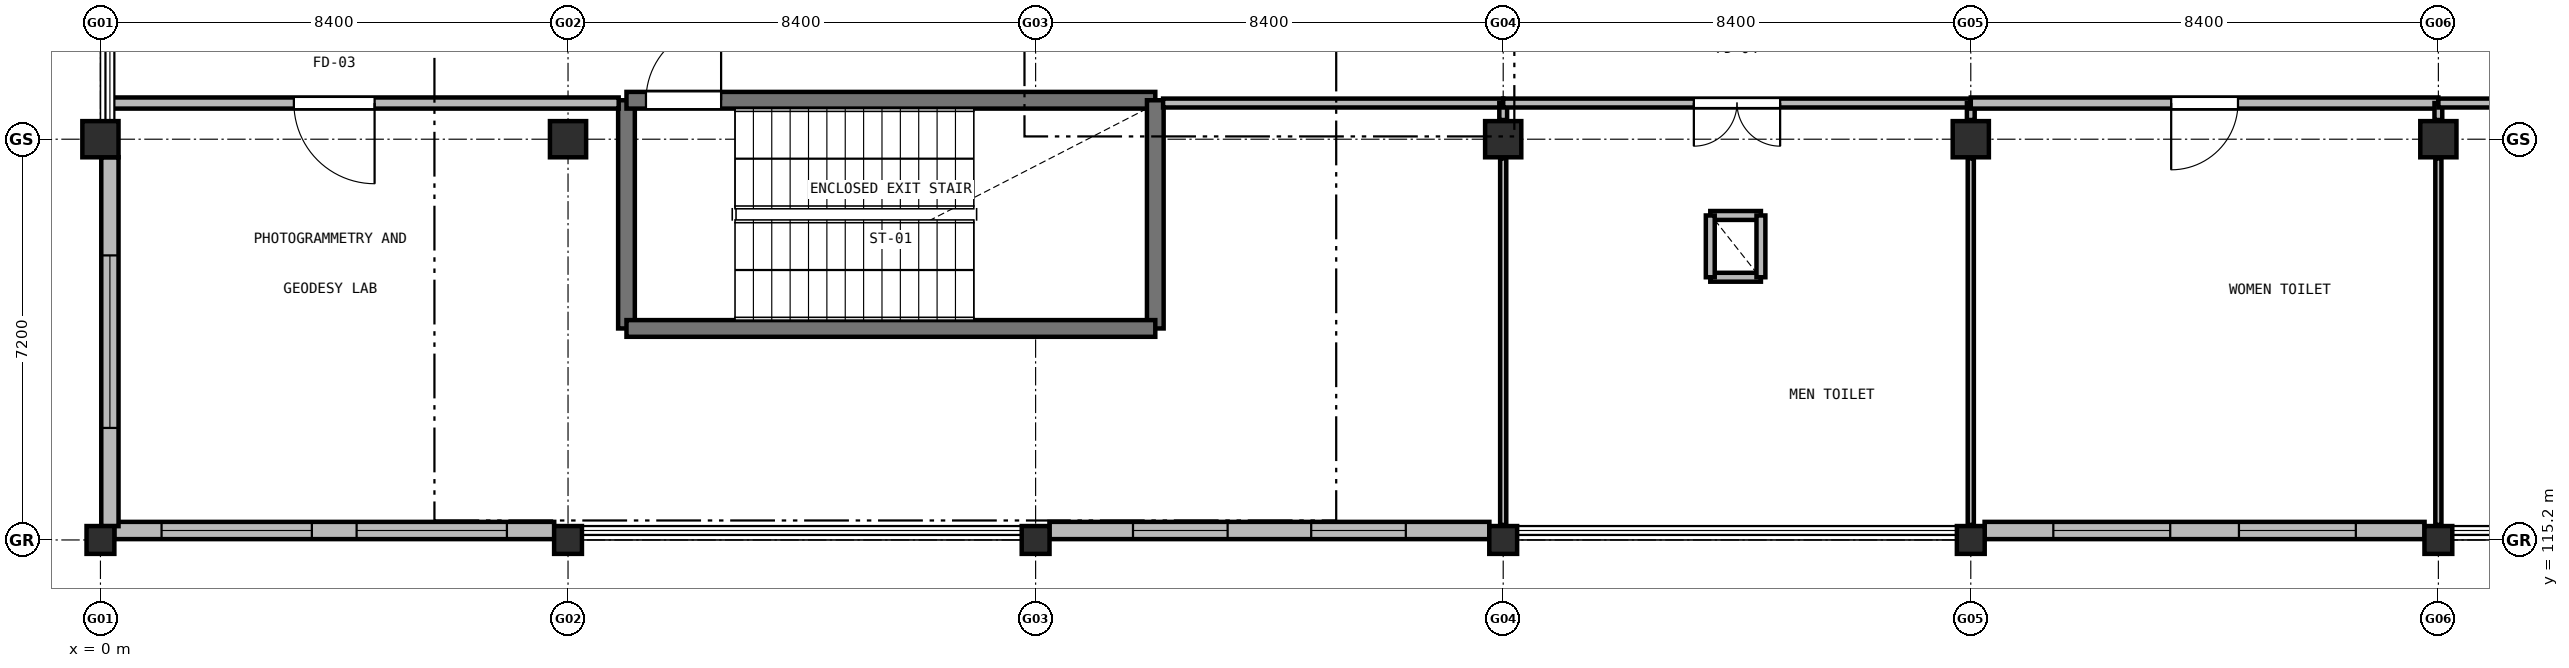
"""IFC4 building model, lengths in metres.
Left out: names, types, materials, properties, quantities, classifications, styles, units other than length and angle.
Written with IfcOpenShell. Run it as: python <this file> out.ifc"""

import sys

from ifc_helpers import new_model, si_unit, direction, frame, frame_2d, origin, origin_2d, place, context, subcontext, project, spatial, rectangle, extrude, element, fill, save


model = new_model("IFC4")
c1 = context("Model", 3, precision=1e-05, world=origin(), true_north=direction((0.0, 1.0)))
c2 = subcontext(c1, "Body", "Model", "MODEL_VIEW")
j1 = project(units=[si_unit("LENGTHUNIT", "METRE"), si_unit("PLANEANGLEUNIT", "RADIAN")], contexts=[c1])
p1 = place(None, origin())
s1 = spatial("IfcSite", under=j1, at=p1, CompositionType="ELEMENT")
p2 = place(p1, origin())
s2 = spatial("IfcBuilding", under=s1, at=p2, CompositionType="ELEMENT")
p3 = place(p2, frame((0.0, 0.0, 13.5)))
s3 = spatial("IfcBuildingStorey", under=s2, at=p3, CompositionType="ELEMENT", Elevation=13.5)
p4 = place(p3, frame((0.0, 115.2, 0.0), z_axis=(0.0, 0.0, 1.0), x_axis=(1.0, 0.0, 0.0)))
e1 = element("IfcColumn", 1, at=p4, inside=s3, PredefinedType="COLUMN", context=c2, shape_type="SweptSolid", body=[
    extrude(rectangle(XDim=0.5, YDim=0.5, at=origin_2d()), origin(), (0.0, 0.0, 1.0), 4.2),
])
p5 = place(p3, frame((0.0, 122.4, 0.0), z_axis=(0.0, 0.0, 1.0), x_axis=(1.0, 0.0, 0.0)))
e2 = element("IfcColumn", 2, at=p5, inside=s3, PredefinedType="COLUMN", context=c2, shape_type="SweptSolid", body=[
    extrude(rectangle(XDim=0.65, YDim=0.65, at=origin_2d()), origin(), (0.0, 0.0, 1.0), 4.2),
])
p6 = place(p3, frame((8.4, 115.2, 0.0), z_axis=(0.0, 0.0, 1.0), x_axis=(1.0, 0.0, 0.0)))
e3 = element("IfcColumn", 3, at=p6, inside=s3, PredefinedType="COLUMN", context=c2, shape_type="SweptSolid", body=[
    extrude(rectangle(XDim=0.5, YDim=0.5, at=origin_2d()), origin(), (0.0, 0.0, 1.0), 4.2),
])
p7 = place(p3, frame((8.4, 122.4, 0.0), z_axis=(0.0, 0.0, 1.0), x_axis=(1.0, 0.0, 0.0)))
e4 = element("IfcColumn", 4, at=p7, inside=s3, PredefinedType="COLUMN", context=c2, shape_type="SweptSolid", body=[
    extrude(rectangle(XDim=0.65, YDim=0.65, at=origin_2d()), origin(), (0.0, 0.0, 1.0), 4.2),
])
for number, where, z_axis, x_axis in (
    (5, (16.8, 115.2, 0.0), (0.0, 0.0, 1.0), (1.0, 0.0, 0.0)),
    (6, (25.2, 115.2, 0.0), (0.0, 0.0, 1.0), (1.0, 0.0, 0.0)),
):
    element("IfcColumn", number, at=place(p3, frame(where, z_axis=z_axis, x_axis=x_axis)), inside=s3, PredefinedType="COLUMN", context=c2, shape_type="SweptSolid", body=[
        extrude(rectangle(XDim=0.5, YDim=0.5, at=origin_2d()), origin(), (0.0, 0.0, 1.0), 4.2),
    ])
p8 = place(p3, frame((25.2, 122.4, 0.0), z_axis=(0.0, 0.0, 1.0), x_axis=(1.0, 0.0, 0.0)))
e7 = element("IfcColumn", 7, at=p8, inside=s3, PredefinedType="COLUMN", context=c2, shape_type="SweptSolid", body=[
    extrude(rectangle(XDim=0.65, YDim=0.65, at=origin_2d()), origin(), (0.0, 0.0, 1.0), 4.2),
])
p9 = place(p3, frame((33.6, 115.2, 0.0), z_axis=(0.0, 0.0, 1.0), x_axis=(1.0, 0.0, 0.0)))
e8 = element("IfcColumn", 8, at=p9, inside=s3, PredefinedType="COLUMN", context=c2, shape_type="SweptSolid", body=[
    extrude(rectangle(XDim=0.5, YDim=0.5, at=origin_2d()), origin(), (0.0, 0.0, 1.0), 4.2),
])
p10 = place(p3, frame((33.6, 122.4, 0.0), z_axis=(0.0, 0.0, 1.0), x_axis=(1.0, 0.0, 0.0)))
e9 = element("IfcColumn", 9, at=p10, inside=s3, PredefinedType="COLUMN", context=c2, shape_type="SweptSolid", body=[
    extrude(rectangle(XDim=0.65, YDim=0.65, at=origin_2d()), origin(), (0.0, 0.0, 1.0), 4.2),
])
p11 = place(p3, frame((42.0, 115.2, 0.0), z_axis=(0.0, 0.0, 1.0), x_axis=(1.0, 0.0, 0.0)))
e10 = element("IfcColumn", 10, at=p11, inside=s3, PredefinedType="COLUMN", context=c2, shape_type="SweptSolid", body=[
    extrude(rectangle(XDim=0.5, YDim=0.5, at=origin_2d()), origin(), (0.0, 0.0, 1.0), 4.2),
])
p12 = place(p3, frame((42.0, 122.4, 0.0), z_axis=(0.0, 0.0, 1.0), x_axis=(1.0, 0.0, 0.0)))
e11 = element("IfcColumn", 11, at=p12, inside=s3, PredefinedType="COLUMN", context=c2, shape_type="SweptSolid", body=[
    extrude(rectangle(XDim=0.65, YDim=0.65, at=origin_2d()), origin(), (0.0, 0.0, 1.0), 4.2),
])
p13 = place(p3, frame((41.752, 115.37, 0.0), z_axis=(0.0, 0.0, 1.0), x_axis=(-1.0, 0.0, 0.0)))
e12 = element("IfcWall", 12, at=p13, inside=s3, PredefinedType="SOLIDWALL", context=c2, shape_type="SweptSolid", body=[
    extrude(rectangle(XDim=7.904, YDim=0.31, at=frame_2d((3.952, 0.0))), origin(), (0.0, 0.0, 1.0), 3.16),
])
p14 = place(p13, frame((1.235, 0.0, 0.95)))
e13 = element("IfcOpeningElement", 13, at=p14, cuts=e12, PredefinedType="OPENING", context=c2, shape_type="SweptSolid", body=[
    extrude(rectangle(XDim=2.1, YDim=1.85, at=frame_2d((1.05, 0.925))), frame((0.0, 0.165, 0.0), z_axis=(0.0, -1.0, 0.0), x_axis=(1.0, 0.0, 0.0)), (0.0, 0.0, 1.0), 0.33),
])
p15 = place(p13, frame((4.569, 0.0, 0.95)))
e14 = element("IfcOpeningElement", 14, at=p15, cuts=e12, PredefinedType="OPENING", context=c2, shape_type="SweptSolid", body=[
    extrude(rectangle(XDim=2.1, YDim=1.85, at=frame_2d((1.05, 0.925))), frame((0.0, 0.165, 0.0), z_axis=(0.0, -1.0, 0.0), x_axis=(1.0, 0.0, 0.0)), (0.0, 0.0, 1.0), 0.33),
])
p16 = place(p3, frame((24.952, 115.37, 0.0), z_axis=(0.0, 0.0, 1.0), x_axis=(-1.0, 0.0, 0.0)))
e15 = element("IfcWall", 15, at=p16, inside=s3, PredefinedType="SOLIDWALL", context=c2, shape_type="SweptSolid", body=[
    extrude(rectangle(XDim=7.904, YDim=0.31, at=frame_2d((3.952, 0.0))), origin(), (0.0, 0.0, 1.0), 3.16),
])
p17 = place(p16, frame((1.501, 0.0, 0.95)))
e16 = element("IfcOpeningElement", 16, at=p17, cuts=e15, PredefinedType="OPENING", context=c2, shape_type="SweptSolid", body=[
    extrude(rectangle(XDim=1.7, YDim=1.65, at=frame_2d((0.85, 0.825))), frame((0.0, 0.165, 0.0), z_axis=(0.0, -1.0, 0.0), x_axis=(1.0, 0.0, 0.0)), (0.0, 0.0, 1.0), 0.33),
])
p18 = place(p16, frame((4.703, 0.0, 0.95)))
e17 = element("IfcOpeningElement", 17, at=p18, cuts=e15, PredefinedType="OPENING", context=c2, shape_type="SweptSolid", body=[
    extrude(rectangle(XDim=1.7, YDim=1.65, at=frame_2d((0.85, 0.825))), frame((0.0, 0.165, 0.0), z_axis=(0.0, -1.0, 0.0), x_axis=(1.0, 0.0, 0.0)), (0.0, 0.0, 1.0), 0.33),
])
p19 = place(p3, frame((8.152, 115.37, 0.0), z_axis=(0.0, 0.0, 1.0), x_axis=(-1.0, 0.0, 0.0)))
e18 = element("IfcWall", 18, at=p19, inside=s3, PredefinedType="SOLIDWALL", context=c2, shape_type="SweptSolid", body=[
    extrude(rectangle(XDim=7.904, YDim=0.31, at=frame_2d((3.952, 0.0))), origin(), (0.0, 0.0, 1.0), 3.16),
])
p20 = place(p19, frame((0.85, 0.0, 0.95)))
e19 = element("IfcOpeningElement", 19, at=p20, cuts=e18, PredefinedType="OPENING", context=c2, shape_type="SweptSolid", body=[
    extrude(rectangle(XDim=2.7, YDim=1.9, at=frame_2d((1.35, 0.95))), frame((0.0, 0.165, 0.0), z_axis=(0.0, -1.0, 0.0), x_axis=(1.0, 0.0, 0.0)), (0.0, 0.0, 1.0), 0.33),
])
p21 = place(p19, frame((4.354, 0.0, 0.95)))
e20 = element("IfcOpeningElement", 20, at=p21, cuts=e18, PredefinedType="OPENING", context=c2, shape_type="SweptSolid", body=[
    extrude(rectangle(XDim=2.7, YDim=1.9, at=frame_2d((1.35, 0.95))), frame((0.0, 0.165, 0.0), z_axis=(0.0, -1.0, 0.0), x_axis=(1.0, 0.0, 0.0)), (0.0, 0.0, 1.0), 0.33),
])
p22 = place(p3, frame((0.17, 115.448, 0.0), z_axis=(0.0, 0.0, 1.0), x_axis=(0.0, 1.0, 0.0)))
e21 = element("IfcWall", 21, at=p22, inside=s3, PredefinedType="SOLIDWALL", context=c2, shape_type="SweptSolid", body=[
    extrude(rectangle(XDim=6.629, YDim=0.31, at=frame_2d((3.314, 0.0))), origin(), (0.0, 0.0, 1.0), 3.36),
])
p23 = place(p22, frame((1.764, 0.0, 0.95)))
e22 = element("IfcOpeningElement", 22, at=p23, cuts=e21, PredefinedType="OPENING", context=c2, shape_type="SweptSolid", body=[
    extrude(rectangle(XDim=3.1, YDim=1.95, at=frame_2d((1.55, 0.975))), frame((0.0, 0.165, 0.0), z_axis=(0.0, -1.0, 0.0), x_axis=(1.0, 0.0, 0.0)), (0.0, 0.0, 1.0), 0.33),
])
p24 = place(p3, frame((9.45, 119.0, 0.0), z_axis=(0.0, 0.0, 1.0), x_axis=(0.0, 1.0, 0.0)))
e23 = element("IfcWall", 23, at=p24, inside=s3, PredefinedType="SHEAR", context=c2, shape_type="SweptSolid", body=[
    extrude(rectangle(XDim=4.1, YDim=0.3, at=frame_2d((2.05, 0.0))), origin(), (0.0, 0.0, 1.0), 3.88),
])
p25 = place(p3, frame((9.45, 123.1, 0.0), z_axis=(0.0, 0.0, 1.0), x_axis=(1.0, 0.0, 0.0)))
e24 = element("IfcWall", 24, at=p25, inside=s3, PredefinedType="SHEAR", context=c2, shape_type="SweptSolid", body=[
    extrude(rectangle(XDim=9.5, YDim=0.3, at=frame_2d((4.75, 0.0))), origin(), (0.0, 0.0, 1.0), 3.88),
])
p26 = place(p25, frame((0.35, 0.0, 0.0)))
e25 = element("IfcOpeningElement", 25, at=p26, cuts=e24, PredefinedType="OPENING", context=c2, shape_type="SweptSolid", body=[
    extrude(rectangle(XDim=1.35, YDim=2.2, at=frame_2d((0.675, 1.1))), frame((0.0, 0.16, 0.0), z_axis=(0.0, -1.0, 0.0), x_axis=(1.0, 0.0, 0.0)), (0.0, 0.0, 1.0), 0.32),
])
p27 = place(p3, frame((18.95, 123.1, 0.0), z_axis=(0.0, 0.0, 1.0), x_axis=(0.0, -1.0, 0.0)))
e26 = element("IfcWall", 26, at=p27, inside=s3, PredefinedType="SHEAR", context=c2, shape_type="SweptSolid", body=[
    extrude(rectangle(XDim=4.1, YDim=0.3, at=frame_2d((2.05, 0.0))), origin(), (0.0, 0.0, 1.0), 3.88),
])
p28 = place(p3, frame((18.95, 119.0, 0.0), z_axis=(0.0, 0.0, 1.0), x_axis=(-1.0, 0.0, 0.0)))
e27 = element("IfcWall", 27, at=p28, inside=s3, PredefinedType="SHEAR", context=c2, shape_type="SweptSolid", body=[
    extrude(rectangle(XDim=9.5, YDim=0.3, at=frame_2d((4.75, 0.0))), origin(), (0.0, 0.0, 1.0), 3.88),
])
for number, where, z_axis, x_axis in (
    (28, (28.92, 119.92, 0.0), (0.0, 0.0, 1.0), (1.0, 0.0, 0.0)),
    (29, (29.83, 121.03, 0.0), (0.0, 0.0, 1.0), (-1.0, 0.0, 0.0)),
):
    element("IfcWall", number, at=place(p3, frame(where, z_axis=z_axis, x_axis=x_axis)), inside=s3, PredefinedType="PARTITIONING", context=c2, shape_type="SweptSolid", body=[
        extrude(rectangle(XDim=0.91, YDim=0.16, at=frame_2d((0.455, 0.0))), origin(), (0.0, 0.0, 1.0), 3.65),
    ])
for number, where, z_axis, x_axis in (
    (30, (28.92, 121.03, 0.0), (0.0, 0.0, 1.0), (0.0, -1.0, 0.0)),
    (31, (29.83, 119.92, 0.0), (0.0, 0.0, 1.0), (0.0, 1.0, 0.0)),
):
    element("IfcWall", number, at=place(p3, frame(where, z_axis=z_axis, x_axis=x_axis)), inside=s3, PredefinedType="PARTITIONING", context=c2, shape_type="SweptSolid", body=[
        extrude(rectangle(XDim=1.11, YDim=0.16, at=frame_2d((0.555, 0.0))), origin(), (0.0, 0.0, 1.0), 3.65),
    ])
p29 = place(p3, frame((25.2, 123.05, 0.0), z_axis=(0.0, 0.0, 1.0), x_axis=(-1.0, 0.0, 0.0)))
e32 = element("IfcWall", 32, at=p29, inside=s3, PredefinedType="PARTITIONING", context=c2, shape_type="SweptSolid", body=[
    extrude(rectangle(XDim=6.11, YDim=0.16, at=frame_2d((3.055, 0.0))), origin(), (0.0, 0.0, 1.0), 3.355),
])
p30 = place(p3, frame((9.31, 123.05, 0.0), z_axis=(0.0, 0.0, 1.0), x_axis=(-1.0, 0.0, 0.0)))
e33 = element("IfcWall", 33, at=p30, inside=s3, PredefinedType="SOLIDWALL", context=c2, shape_type="SweptSolid", body=[
    extrude(rectangle(XDim=9.09, YDim=0.2, at=frame_2d((4.545, 0.0))), origin(), (0.0, 0.0, 1.0), 3.355),
])
p31 = place(p30, frame((4.385, 0.0, 0.0)))
e34 = element("IfcOpeningElement", 34, at=p31, cuts=e33, PredefinedType="OPENING", context=c2, shape_type="SweptSolid", body=[
    extrude(rectangle(XDim=1.45, YDim=2.2, at=frame_2d((0.725, 1.1))), frame((0.0, 0.11, 0.0), z_axis=(0.0, -1.0, 0.0), x_axis=(1.0, 0.0, 0.0)), (0.0, 0.0, 1.0), 0.22),
])
p32 = place(p3, frame((25.2, 115.47, 0.0), z_axis=(0.0, 0.0, 1.0), x_axis=(0.0, 1.0, 0.0)))
e35 = element("IfcWall", 35, at=p32, inside=s3, PredefinedType="PARTITIONING", context=c2, shape_type="SweptSolid", body=[
    extrude(rectangle(XDim=6.585, YDim=0.11, at=frame_2d((3.292, 0.0))), origin(), (0.0, 0.0, 1.0), 3.155),
])
p33 = place(p3, frame((25.2, 122.745, 0.0), z_axis=(0.0, 0.0, 1.0), x_axis=(0.0, 1.0, 0.0)))
e36 = element("IfcWall", 36, at=p33, inside=s3, PredefinedType="PARTITIONING", context=c2, shape_type="SweptSolid", body=[
    extrude(rectangle(XDim=0.305, YDim=0.14, at=frame_2d((0.152, 0.0))), origin(), (0.0, 0.0, 1.0), 3.225),
])
p34 = place(p3, frame((33.6, 123.05, 0.0), z_axis=(0.0, 0.0, 1.0), x_axis=(-1.0, 0.0, 0.0)))
e37 = element("IfcWall", 37, at=p34, inside=s3, PredefinedType="PARTITIONING", context=c2, shape_type="SweptSolid", body=[
    extrude(rectangle(XDim=8.4, YDim=0.16, at=frame_2d((4.2, 0.0))), origin(), (0.0, 0.0, 1.0), 3.355),
])
p35 = place(p34, frame((3.425, 0.0, 0.0)))
e38 = element("IfcOpeningElement", 38, at=p35, cuts=e37, PredefinedType="OPENING", context=c2, shape_type="SweptSolid", body=[
    extrude(rectangle(XDim=1.55, YDim=2.2, at=frame_2d((0.775, 1.1))), frame((0.0, 0.09, 0.0), z_axis=(0.0, -1.0, 0.0), x_axis=(1.0, 0.0, 0.0)), (0.0, 0.0, 1.0), 0.18),
])
p36 = place(p3, frame((33.6, 115.47, 0.0), z_axis=(0.0, 0.0, 1.0), x_axis=(0.0, 1.0, 0.0)))
e39 = element("IfcWall", 39, at=p36, inside=s3, PredefinedType="PARTITIONING", context=c2, shape_type="SweptSolid", body=[
    extrude(rectangle(XDim=6.585, YDim=0.11, at=frame_2d((3.292, 0.0))), origin(), (0.0, 0.0, 1.0), 3.155),
])
p37 = place(p3, frame((33.6, 122.745, 0.0), z_axis=(0.0, 0.0, 1.0), x_axis=(0.0, 1.0, 0.0)))
e40 = element("IfcWall", 40, at=p37, inside=s3, PredefinedType="PARTITIONING", context=c2, shape_type="SweptSolid", body=[
    extrude(rectangle(XDim=0.305, YDim=0.14, at=frame_2d((0.152, 0.0))), origin(), (0.0, 0.0, 1.0), 3.225),
])
p38 = place(p3, frame((42.0, 123.05, 0.0), z_axis=(0.0, 0.0, 1.0), x_axis=(-1.0, 0.0, 0.0)))
e41 = element("IfcWall", 41, at=p38, inside=s3, PredefinedType="SOLIDWALL", context=c2, shape_type="SweptSolid", body=[
    extrude(rectangle(XDim=8.4, YDim=0.2, at=frame_2d((4.2, 0.0))), origin(), (0.0, 0.0, 1.0), 3.355),
])
p39 = place(p38, frame((3.6, 0.0, 0.0)))
e42 = element("IfcOpeningElement", 42, at=p39, cuts=e41, PredefinedType="OPENING", context=c2, shape_type="SweptSolid", body=[
    extrude(rectangle(XDim=1.2, YDim=2.15, at=frame_2d((0.6, 1.075))), frame((0.0, 0.11, 0.0), z_axis=(0.0, -1.0, 0.0), x_axis=(1.0, 0.0, 0.0)), (0.0, 0.0, 1.0), 0.22),
])
p40 = place(p3, frame((42.0, 115.47, 0.0), z_axis=(0.0, 0.0, 1.0), x_axis=(0.0, 1.0, 0.0)))
e43 = element("IfcWall", 43, at=p40, inside=s3, PredefinedType="PARTITIONING", context=c2, shape_type="SweptSolid", body=[
    extrude(rectangle(XDim=6.585, YDim=0.11, at=frame_2d((3.292, 0.0))), origin(), (0.0, 0.0, 1.0), 3.155),
])
p41 = place(p3, frame((42.0, 122.745, 0.0), z_axis=(0.0, 0.0, 1.0), x_axis=(0.0, 1.0, 0.0)))
e44 = element("IfcWall", 44, at=p41, inside=s3, PredefinedType="PARTITIONING", context=c2, shape_type="SweptSolid", body=[
    extrude(rectangle(XDim=0.305, YDim=0.14, at=frame_2d((0.152, 0.0))), origin(), (0.0, 0.0, 1.0), 3.225),
])
p42 = place(p3, frame((50.4, 123.05, 0.0), z_axis=(0.0, 0.0, 1.0), x_axis=(-1.0, 0.0, 0.0)))
e45 = element("IfcWall", 45, at=p42, inside=s3, PredefinedType="PARTITIONING", context=c2, shape_type="SweptSolid", body=[
    extrude(rectangle(XDim=8.4, YDim=0.16, at=frame_2d((4.2, 0.0))), origin(), (0.0, 0.0, 1.0), 3.355),
])
p43 = place(p42, frame((3.625, 0.0, 0.0)))
e46 = element("IfcOpeningElement", 46, at=p43, cuts=e45, PredefinedType="OPENING", context=c2, shape_type="SweptSolid", body=[
    extrude(rectangle(XDim=1.15, YDim=2.15, at=frame_2d((0.575, 1.075))), frame((0.0, 0.09, 0.0), z_axis=(0.0, -1.0, 0.0), x_axis=(1.0, 0.0, 0.0)), (0.0, 0.0, 1.0), 0.18),
])
p44 = place(p14, origin())
e47 = element("IfcWindow", 47, at=p44, inside=s3, PartitioningType="SINGLE_PANEL", PredefinedType="WINDOW", context=c2, shape_type="SweptSolid", body=[
    extrude(rectangle(XDim=2.1, YDim=1.85, at=frame_2d((1.05, 0.925))), frame((0.0, 0.03, 0.0), z_axis=(0.0, -1.0, 0.0), x_axis=(1.0, 0.0, 0.0)), (0.0, 0.0, 1.0), 0.06),
])
fill(e13, e47)
p45 = place(p15, origin())
e48 = element("IfcWindow", 48, at=p45, inside=s3, PartitioningType="SINGLE_PANEL", PredefinedType="WINDOW", context=c2, shape_type="SweptSolid", body=[
    extrude(rectangle(XDim=2.1, YDim=1.85, at=frame_2d((1.05, 0.925))), frame((0.0, 0.03, 0.0), z_axis=(0.0, -1.0, 0.0), x_axis=(1.0, 0.0, 0.0)), (0.0, 0.0, 1.0), 0.06),
])
fill(e14, e48)
p46 = place(p17, origin())
e49 = element("IfcWindow", 49, at=p46, inside=s3, PartitioningType="SINGLE_PANEL", PredefinedType="WINDOW", context=c2, shape_type="SweptSolid", body=[
    extrude(rectangle(XDim=1.7, YDim=1.65, at=frame_2d((0.85, 0.825))), frame((0.0, 0.03, 0.0), z_axis=(0.0, -1.0, 0.0), x_axis=(1.0, 0.0, 0.0)), (0.0, 0.0, 1.0), 0.06),
])
fill(e16, e49)
p47 = place(p18, origin())
e50 = element("IfcWindow", 50, at=p47, inside=s3, PartitioningType="SINGLE_PANEL", PredefinedType="WINDOW", context=c2, shape_type="SweptSolid", body=[
    extrude(rectangle(XDim=1.7, YDim=1.65, at=frame_2d((0.85, 0.825))), frame((0.0, 0.03, 0.0), z_axis=(0.0, -1.0, 0.0), x_axis=(1.0, 0.0, 0.0)), (0.0, 0.0, 1.0), 0.06),
])
fill(e17, e50)
p48 = place(p20, origin())
e51 = element("IfcWindow", 51, at=p48, inside=s3, PartitioningType="SINGLE_PANEL", PredefinedType="WINDOW", context=c2, shape_type="SweptSolid", body=[
    extrude(rectangle(XDim=2.7, YDim=1.9, at=frame_2d((1.35, 0.95))), frame((0.0, 0.03, 0.0), z_axis=(0.0, -1.0, 0.0), x_axis=(1.0, 0.0, 0.0)), (0.0, 0.0, 1.0), 0.06),
])
fill(e19, e51)
p49 = place(p21, origin())
e52 = element("IfcWindow", 52, at=p49, inside=s3, PartitioningType="SINGLE_PANEL", PredefinedType="WINDOW", context=c2, shape_type="SweptSolid", body=[
    extrude(rectangle(XDim=2.7, YDim=1.9, at=frame_2d((1.35, 0.95))), frame((0.0, 0.03, 0.0), z_axis=(0.0, -1.0, 0.0), x_axis=(1.0, 0.0, 0.0)), (0.0, 0.0, 1.0), 0.06),
])
fill(e20, e52)
p50 = place(p23, origin())
e53 = element("IfcWindow", 53, at=p50, inside=s3, PartitioningType="SINGLE_PANEL", PredefinedType="WINDOW", context=c2, shape_type="SweptSolid", body=[
    extrude(rectangle(XDim=3.1, YDim=1.95, at=frame_2d((1.55, 0.975))), frame((0.0, 0.03, 0.0), z_axis=(0.0, -1.0, 0.0), x_axis=(1.0, 0.0, 0.0)), (0.0, 0.0, 1.0), 0.06),
])
fill(e22, e53)
p51 = place(p26, origin())
e54 = element("IfcDoor", 54, at=p51, inside=s3, OperationType="SINGLE_SWING_RIGHT", PredefinedType="DOOR", context=c2, shape_type="SweptSolid", body=[
    extrude(rectangle(XDim=1.35, YDim=2.2, at=frame_2d((0.675, 1.1))), frame((0.0, 0.025, 0.0), z_axis=(0.0, -1.0, 0.0), x_axis=(1.0, 0.0, 0.0)), (0.0, 0.0, 1.0), 0.05),
])
fill(e25, e54)
p52 = place(p31, origin())
e55 = element("IfcDoor", 55, at=p52, inside=s3, OperationType="SINGLE_SWING_LEFT", PredefinedType="DOOR", context=c2, shape_type="SweptSolid", body=[
    extrude(rectangle(XDim=1.45, YDim=2.2, at=frame_2d((0.725, 1.1))), frame((0.0, 0.025, 0.0), z_axis=(0.0, -1.0, 0.0), x_axis=(1.0, 0.0, 0.0)), (0.0, 0.0, 1.0), 0.05),
])
fill(e34, e55)
p53 = place(p35, origin())
e56 = element("IfcDoor", 56, at=p53, inside=s3, OperationType="DOUBLE_DOOR_SINGLE_SWING", PredefinedType="DOOR", context=c2, shape_type="SweptSolid", body=[
    extrude(rectangle(XDim=1.55, YDim=2.2, at=frame_2d((0.775, 1.1))), frame((0.0, 0.025, 0.0), z_axis=(0.0, -1.0, 0.0), x_axis=(1.0, 0.0, 0.0)), (0.0, 0.0, 1.0), 0.05),
])
fill(e38, e56)
p54 = place(p39, origin())
e57 = element("IfcDoor", 57, at=p54, inside=s3, OperationType="SINGLE_SWING_RIGHT", PredefinedType="DOOR", context=c2, shape_type="SweptSolid", body=[
    extrude(rectangle(XDim=1.2, YDim=2.15, at=frame_2d((0.6, 1.075))), frame((0.0, 0.025, 0.0), z_axis=(0.0, -1.0, 0.0), x_axis=(1.0, 0.0, 0.0)), (0.0, 0.0, 1.0), 0.05),
])
fill(e42, e57)
save(model, sys.argv[1])
